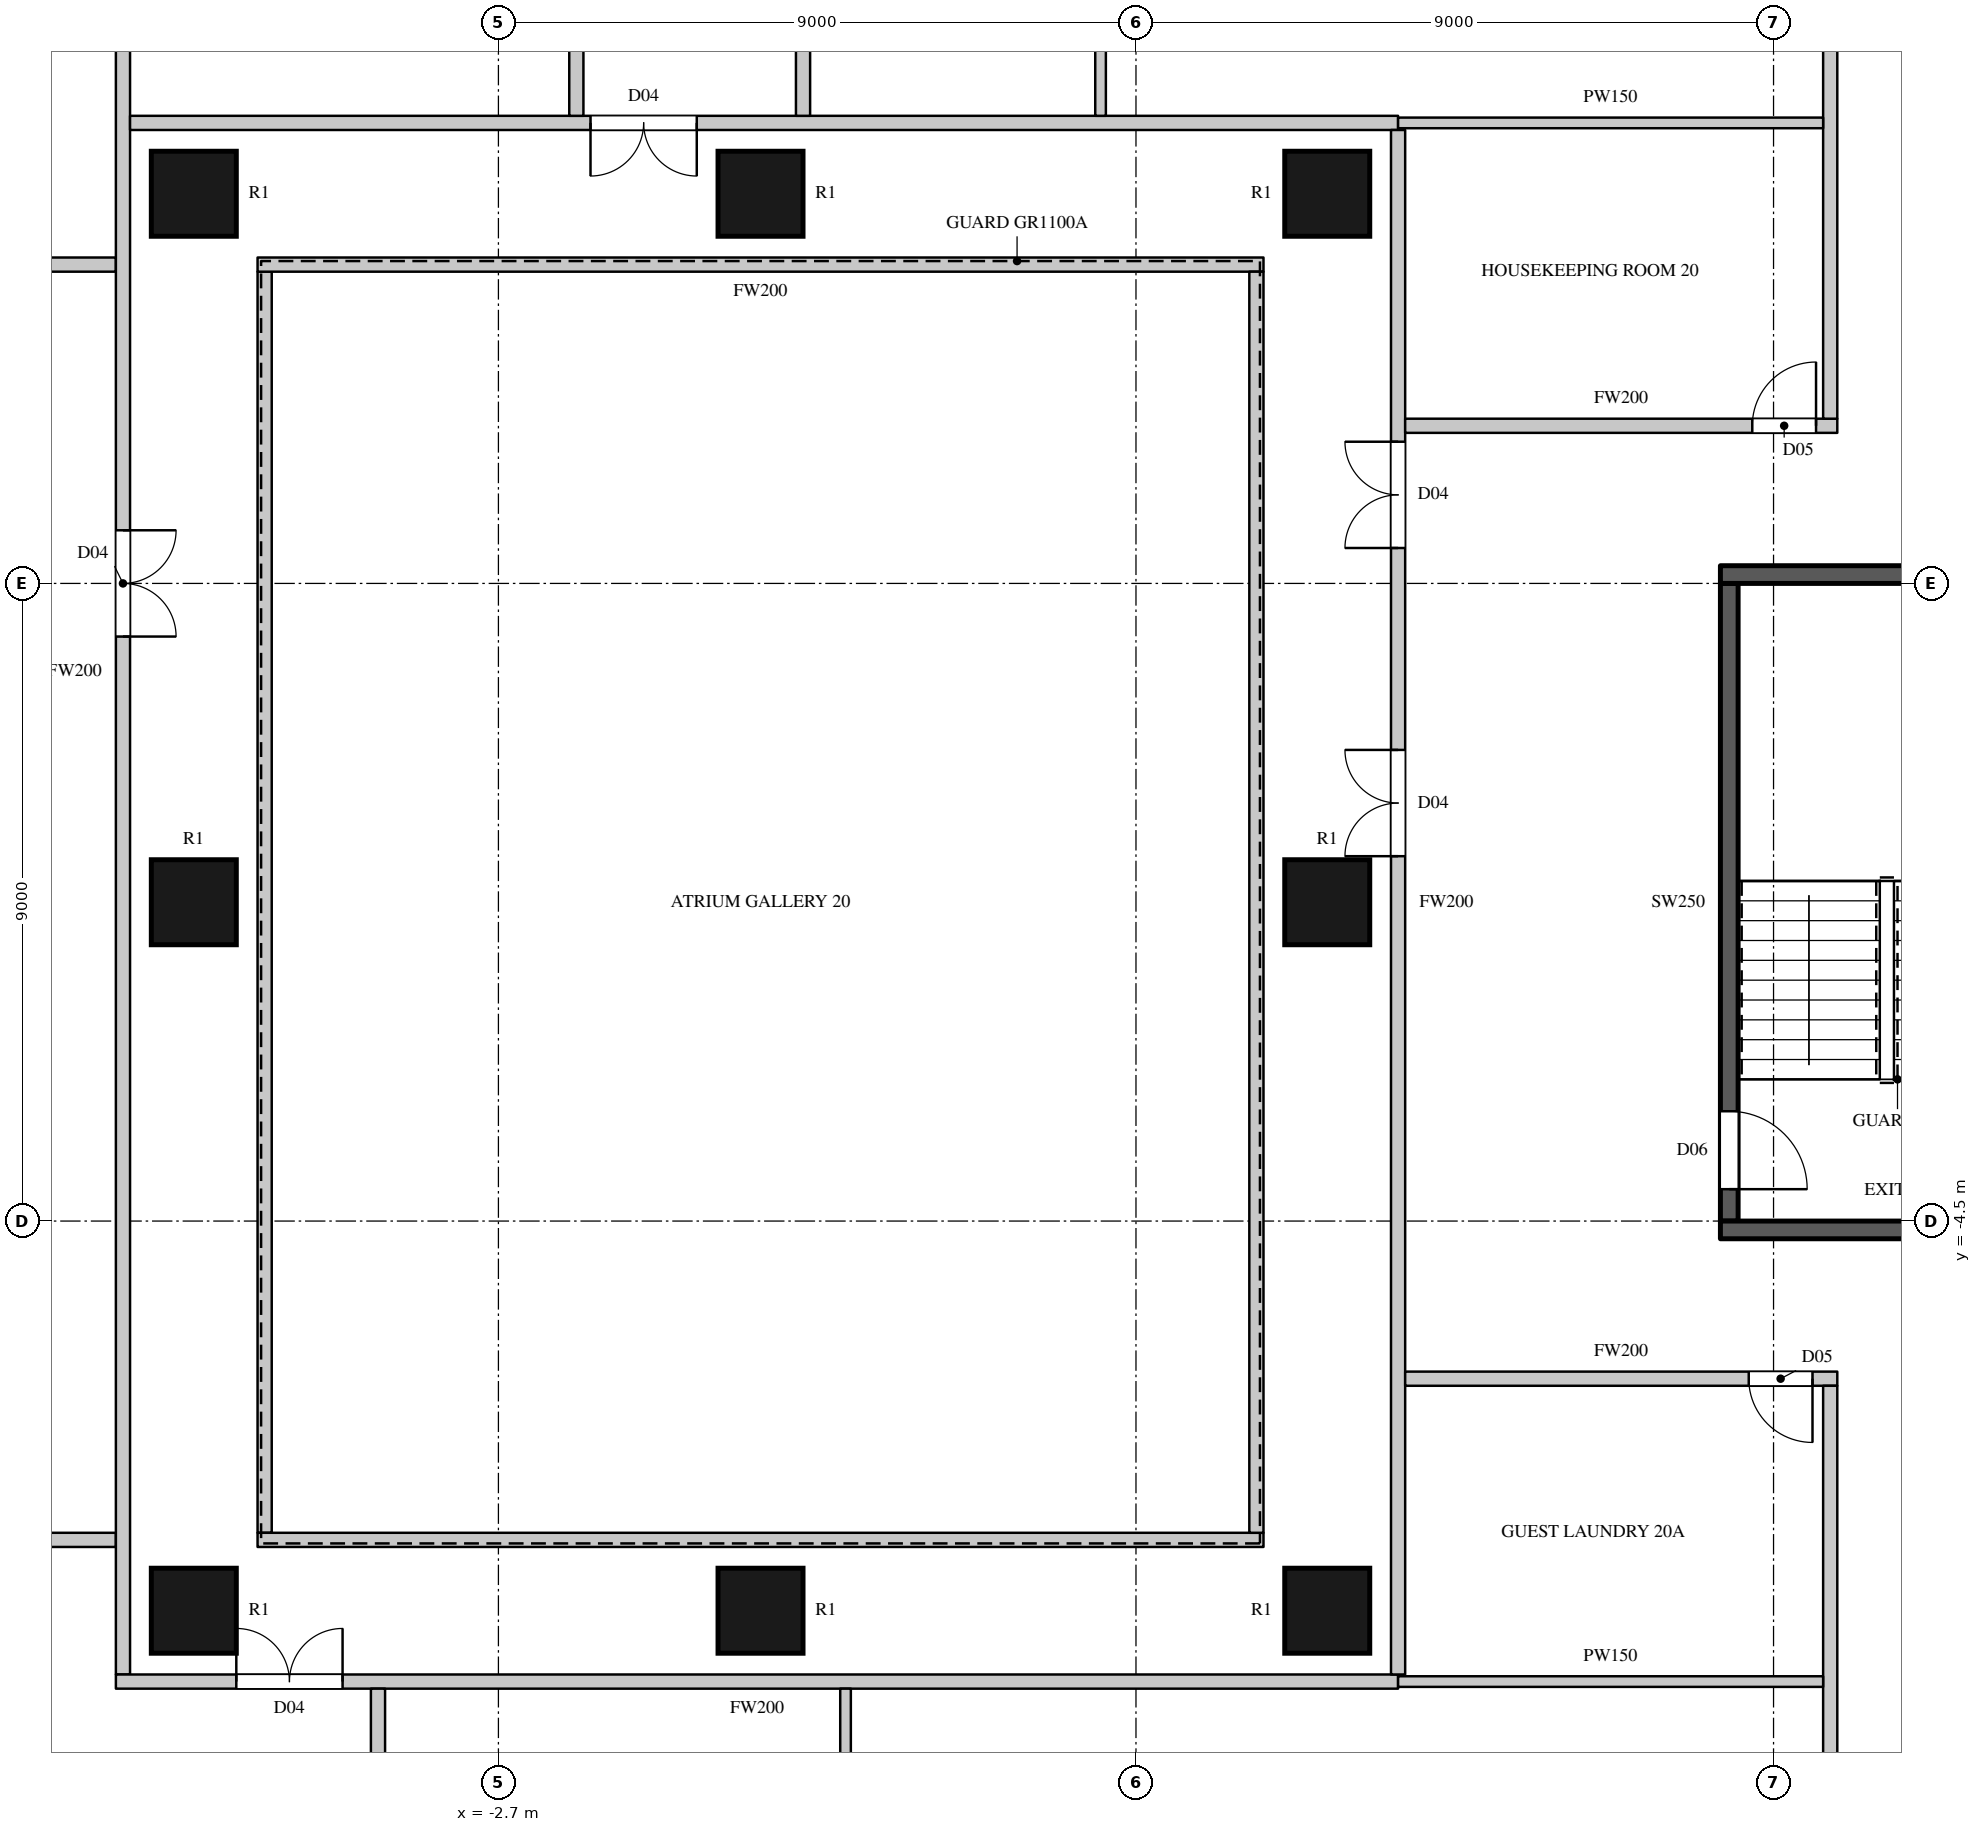
"""IFC4 building model, lengths in metres.
Left out: names, types, materials, properties, quantities, classifications, styles, units other than length and angle.
Written with IfcOpenShell. Run it as: python <this file> out.ifc"""

import sys

from ifc_helpers import new_model, si_unit, direction, frame, frame_2d, origin, origin_2d, place, context, subcontext, project, spatial, rectangle, circle, extrude, element, fill, save


model = new_model("IFC4")
c1 = context("Model", 3, precision=1e-05, world=origin(), true_north=direction((0.0, 1.0)))
c2 = subcontext(c1, "Body", "Model", "MODEL_VIEW")
j1 = project(units=[si_unit("LENGTHUNIT", "METRE"), si_unit("PLANEANGLEUNIT", "RADIAN")], contexts=[c1])
p1 = place(None, origin())
s1 = spatial("IfcSite", under=j1, at=p1, CompositionType="ELEMENT")
p2 = place(p1, origin())
s2 = spatial("IfcBuilding", under=s1, at=p2, CompositionType="ELEMENT")
p3 = place(p2, frame((0.0, 0.0, 102.3)))
s3 = spatial("IfcBuildingStorey", under=s2, at=p3, CompositionType="ELEMENT", Elevation=102.3)
for number, where, z_axis, x_axis in (
    (1, (-7.0, -10.0, 0.0), (0.0, 0.0, 1.0), (1.0, 0.0, 0.0)),
    (2, (-7.0, 0.0, 0.0), (0.0, 0.0, 1.0), (1.0, 0.0, 0.0)),
    (3, (-7.0, 10.0, 0.0), (0.0, 0.0, 1.0), (1.0, 0.0, 0.0)),
    (4, (1.0, -10.0, 0.0), (0.0, 0.0, 1.0), (1.0, 0.0, 0.0)),
    (5, (1.0, 10.0, 0.0), (0.0, 0.0, 1.0), (1.0, 0.0, 0.0)),
    (6, (9.0, -10.0, 0.0), (0.0, 0.0, 1.0), (1.0, 0.0, 0.0)),
    (7, (9.0, 0.0, 0.0), (0.0, 0.0, 1.0), (1.0, 0.0, 0.0)),
    (8, (9.0, 10.0, 0.0), (0.0, 0.0, 1.0), (1.0, 0.0, 0.0)),
):
    element("IfcColumn", number, at=place(p3, frame(where, z_axis=z_axis, x_axis=x_axis)), inside=s3, PredefinedType="COLUMN", context=c2, shape_type="SweptSolid", body=[
        extrude(circle(Radius=0.6, at=origin_2d()), origin(), (0.0, 0.0, 1.0), 3.6),
    ])
p4 = place(p3, frame((-13.97, -9.0, 0.0), z_axis=(0.0, 0.0, 1.0), x_axis=(1.0, 0.0, 0.0)))
e9 = element("IfcWall", 9, at=p4, inside=s3, PredefinedType="PARTITIONING", context=c2, shape_type="SweptSolid", body=[
    extrude(rectangle(XDim=5.87, YDim=0.2, at=frame_2d((2.935, 0.0))), origin(), (0.0, 0.0, 1.0), 3.3),
])
p5 = place(p4, frame((0.4, 0.0, 0.0)))
e10 = element("IfcOpeningElement", 10, at=p5, cuts=e9, PredefinedType="OPENING", context=c2, shape_type="SweptSolid", body=[
    extrude(rectangle(XDim=1.5, YDim=2.2, at=frame_2d((0.75, 1.1))), frame((0.0, 0.11, 0.0), z_axis=(0.0, -1.0, 0.0), x_axis=(1.0, 0.0, 0.0)), (0.0, 0.0, 1.0), 0.22),
])
p6 = place(p4, frame((2.05, 0.0, 0.0)))
e11 = element("IfcOpeningElement", 11, at=p6, cuts=e9, PredefinedType="OPENING", context=c2, shape_type="SweptSolid", body=[
    extrude(rectangle(XDim=1.5, YDim=2.2, at=frame_2d((0.75, 1.1))), frame((0.0, 0.11, 0.0), z_axis=(0.0, -1.0, 0.0), x_axis=(1.0, 0.0, 0.0)), (0.0, 0.0, 1.0), 0.22),
])
p7 = place(p3, frame((-13.97, 9.0, 0.0), z_axis=(0.0, 0.0, 1.0), x_axis=(1.0, 0.0, 0.0)))
e12 = element("IfcWall", 12, at=p7, inside=s3, PredefinedType="PARTITIONING", context=c2, shape_type="SweptSolid", body=[
    extrude(rectangle(XDim=5.87, YDim=0.2, at=frame_2d((2.935, 0.0))), origin(), (0.0, 0.0, 1.0), 3.3),
])
p8 = place(p3, frame((-8.0, -10.9, 0.0), z_axis=(0.0, 0.0, 1.0), x_axis=(0.0, 1.0, 0.0)))
e13 = element("IfcWall", 13, at=p8, inside=s3, PredefinedType="PARTITIONING", context=c2, shape_type="SweptSolid", body=[
    extrude(rectangle(XDim=28.3, YDim=0.2, at=frame_2d((14.15, 0.0))), origin(), (0.0, 0.0, 1.0), 3.3),
])
p9 = place(p8, frame((14.65, 0.0, 0.0)))
e14 = element("IfcOpeningElement", 14, at=p9, cuts=e13, PredefinedType="OPENING", context=c2, shape_type="SweptSolid", body=[
    extrude(rectangle(XDim=1.5, YDim=2.2, at=frame_2d((0.75, 1.1))), frame((0.0, 0.11, 0.0), z_axis=(0.0, -1.0, 0.0), x_axis=(1.0, 0.0, 0.0)), (0.0, 0.0, 1.0), 0.22),
])
p10 = place(p8, frame((26.55, 0.0, 0.0)))
e15 = element("IfcOpeningElement", 15, at=p10, cuts=e13, PredefinedType="OPENING", context=c2, shape_type="SweptSolid", body=[
    extrude(rectangle(XDim=1.6, YDim=2.4, at=frame_2d((0.8, 1.2))), frame((0.0, 0.11, 0.0), z_axis=(0.0, -1.0, 0.0), x_axis=(1.0, 0.0, 0.0)), (0.0, 0.0, 1.0), 0.22),
])
p11 = place(p3, frame((-8.1, -11.0, 0.0), z_axis=(0.0, 0.0, 1.0), x_axis=(1.0, 0.0, 0.0)))
e16 = element("IfcWall", 16, at=p11, inside=s3, PredefinedType="PARTITIONING", context=c2, shape_type="SweptSolid", body=[
    extrude(rectangle(XDim=18.1, YDim=0.2, at=frame_2d((9.05, 0.0))), origin(), (0.0, 0.0, 1.0), 3.3),
])
p12 = place(p11, frame((1.7, 0.0, 0.0)))
e17 = element("IfcOpeningElement", 17, at=p12, cuts=e16, PredefinedType="OPENING", context=c2, shape_type="SweptSolid", body=[
    extrude(rectangle(XDim=1.5, YDim=2.2, at=frame_2d((0.75, 1.1))), frame((0.0, 0.11, 0.0), z_axis=(0.0, -1.0, 0.0), x_axis=(1.0, 0.0, 0.0)), (0.0, 0.0, 1.0), 0.22),
])
p13 = place(p3, frame((-7.9, 11.0, 0.0), z_axis=(0.0, 0.0, 1.0), x_axis=(1.0, 0.0, 0.0)))
e18 = element("IfcWall", 18, at=p13, inside=s3, PredefinedType="PARTITIONING", context=c2, shape_type="SweptSolid", body=[
    extrude(rectangle(XDim=17.9, YDim=0.2, at=frame_2d((8.95, 0.0))), origin(), (0.0, 0.0, 1.0), 3.3),
])
p14 = place(p13, frame((6.5, 0.0, 0.0)))
e19 = element("IfcOpeningElement", 19, at=p14, cuts=e18, PredefinedType="OPENING", context=c2, shape_type="SweptSolid", body=[
    extrude(rectangle(XDim=1.5, YDim=2.2, at=frame_2d((0.75, 1.1))), frame((0.0, 0.11, 0.0), z_axis=(0.0, -1.0, 0.0), x_axis=(1.0, 0.0, 0.0)), (0.0, 0.0, 1.0), 0.22),
])
p15 = place(p3, frame((-6.0, -8.9, 0.0), z_axis=(0.0, 0.0, 1.0), x_axis=(0.0, 1.0, 0.0)))
e20 = element("IfcWall", 20, at=p15, inside=s3, PredefinedType="PARTITIONING", context=c2, shape_type="SweptSolid", body=[
    extrude(rectangle(XDim=17.8, YDim=0.2, at=frame_2d((8.9, 0.0))), origin(), (0.0, 0.0, 1.0), 3.3),
])
for number, where, z_axis, x_axis in (
    (21, (-6.1, -9.0, 0.0), (0.0, 0.0, 1.0), (1.0, 0.0, 0.0)),
    (22, (-6.1, 9.0, 0.0), (0.0, 0.0, 1.0), (1.0, 0.0, 0.0)),
):
    element("IfcWall", number, at=place(p3, frame(where, z_axis=z_axis, x_axis=x_axis)), inside=s3, PredefinedType="PARTITIONING", context=c2, shape_type="SweptSolid", body=[
        extrude(rectangle(XDim=14.2, YDim=0.2, at=frame_2d((7.1, 0.0))), origin(), (0.0, 0.0, 1.0), 3.3),
    ])
p16 = place(p3, frame((-4.4, -17.4, 0.0), z_axis=(0.0, 0.0, 1.0), x_axis=(0.0, 1.0, 0.0)))
e23 = element("IfcWall", 23, at=p16, inside=s3, PredefinedType="PARTITIONING", context=c2, shape_type="SweptSolid", body=[
    extrude(rectangle(XDim=6.3, YDim=0.2, at=frame_2d((3.15, 0.0))), origin(), (0.0, 0.0, 1.0), 3.3),
])
p17 = place(p16, frame((0.15, 0.0, 0.0)))
e24 = element("IfcOpeningElement", 24, at=p17, cuts=e23, PredefinedType="OPENING", context=c2, shape_type="SweptSolid", body=[
    extrude(rectangle(XDim=1.6, YDim=2.4, at=frame_2d((0.8, 1.2))), frame((0.0, 0.11, 0.0), z_axis=(0.0, -1.0, 0.0), x_axis=(1.0, 0.0, 0.0)), (0.0, 0.0, 1.0), 0.22),
])
p18 = place(p3, frame((-1.6, 11.1, 0.0), z_axis=(0.0, 0.0, 1.0), x_axis=(0.0, 1.0, 0.0)))
e25 = element("IfcWall", 25, at=p18, inside=s3, PredefinedType="PARTITIONING", context=c2, shape_type="SweptSolid", body=[
    extrude(rectangle(XDim=6.3, YDim=0.2, at=frame_2d((3.15, 0.0))), origin(), (0.0, 0.0, 1.0), 3.3),
])
p19 = place(p3, frame((1.6, 11.1, 0.0), z_axis=(0.0, 0.0, 1.0), x_axis=(0.0, 1.0, 0.0)))
e26 = element("IfcWall", 26, at=p19, inside=s3, PredefinedType="PARTITIONING", context=c2, shape_type="SweptSolid", body=[
    extrude(rectangle(XDim=6.3, YDim=0.2, at=frame_2d((3.15, 0.0))), origin(), (0.0, 0.0, 1.0), 3.3),
])
p20 = place(p19, frame((5.25, 0.0, 0.0)))
e27 = element("IfcOpeningElement", 27, at=p20, cuts=e26, PredefinedType="OPENING", context=c2, shape_type="SweptSolid", body=[
    extrude(rectangle(XDim=0.9, YDim=2.2, at=frame_2d((0.45, 1.1))), frame((0.0, 0.11, 0.0), z_axis=(0.0, -1.0, 0.0), x_axis=(1.0, 0.0, 0.0)), (0.0, 0.0, 1.0), 0.22),
])
p21 = place(p3, frame((8.0, -8.9, 0.0), z_axis=(0.0, 0.0, 1.0), x_axis=(0.0, 1.0, 0.0)))
e28 = element("IfcWall", 28, at=p21, inside=s3, PredefinedType="PARTITIONING", context=c2, shape_type="SweptSolid", body=[
    extrude(rectangle(XDim=17.8, YDim=0.2, at=frame_2d((8.9, 0.0))), origin(), (0.0, 0.0, 1.0), 3.3),
])
p22 = place(p3, frame((10.0, -10.9, 0.0), z_axis=(0.0, 0.0, 1.0), x_axis=(0.0, 1.0, 0.0)))
e29 = element("IfcWall", 29, at=p22, inside=s3, PredefinedType="PARTITIONING", context=c2, shape_type="SweptSolid", body=[
    extrude(rectangle(XDim=21.8, YDim=0.2, at=frame_2d((10.9, 0.0))), origin(), (0.0, 0.0, 1.0), 3.3),
])
p23 = place(p22, frame((15.9, 0.0, 0.0)))
e30 = element("IfcOpeningElement", 30, at=p23, cuts=e29, PredefinedType="OPENING", context=c2, shape_type="SweptSolid", body=[
    extrude(rectangle(XDim=1.5, YDim=2.2, at=frame_2d((0.75, 1.1))), frame((0.0, 0.11, 0.0), z_axis=(0.0, -1.0, 0.0), x_axis=(1.0, 0.0, 0.0)), (0.0, 0.0, 1.0), 0.22),
])
p24 = place(p22, frame((11.55, 0.0, 0.0)))
e31 = element("IfcOpeningElement", 31, at=p24, cuts=e29, PredefinedType="OPENING", context=c2, shape_type="SweptSolid", body=[
    extrude(rectangle(XDim=1.5, YDim=2.2, at=frame_2d((0.75, 1.1))), frame((0.0, 0.11, 0.0), z_axis=(0.0, -1.0, 0.0), x_axis=(1.0, 0.0, 0.0)), (0.0, 0.0, 1.0), 0.22),
])
p25 = place(p3, frame((10.1, -6.725, 0.0), z_axis=(0.0, 0.0, 1.0), x_axis=(1.0, 0.0, 0.0)))
e32 = element("IfcWall", 32, at=p25, inside=s3, PredefinedType="PARTITIONING", context=c2, shape_type="SweptSolid", body=[
    extrude(rectangle(XDim=6.1, YDim=0.2, at=frame_2d((3.05, 0.0))), origin(), (0.0, 0.0, 1.0), 3.3),
])
p26 = place(p25, frame((4.85, 0.0, 0.0)))
e33 = element("IfcOpeningElement", 33, at=p26, cuts=e32, PredefinedType="OPENING", context=c2, shape_type="SweptSolid", body=[
    extrude(rectangle(XDim=0.9, YDim=2.2, at=frame_2d((0.45, 1.1))), frame((0.0, 0.11, 0.0), z_axis=(0.0, -1.0, 0.0), x_axis=(1.0, 0.0, 0.0)), (0.0, 0.0, 1.0), 0.22),
])
p27 = place(p3, frame((10.1, 6.725, 0.0), z_axis=(0.0, 0.0, 1.0), x_axis=(1.0, 0.0, 0.0)))
e34 = element("IfcWall", 34, at=p27, inside=s3, PredefinedType="PARTITIONING", context=c2, shape_type="SweptSolid", body=[
    extrude(rectangle(XDim=6.1, YDim=0.2, at=frame_2d((3.05, 0.0))), origin(), (0.0, 0.0, 1.0), 3.3),
])
p28 = place(p27, frame((4.9, 0.0, 0.0)))
e35 = element("IfcOpeningElement", 35, at=p28, cuts=e34, PredefinedType="OPENING", context=c2, shape_type="SweptSolid", body=[
    extrude(rectangle(XDim=0.9, YDim=2.2, at=frame_2d((0.45, 1.1))), frame((0.0, 0.11, 0.0), z_axis=(0.0, -1.0, 0.0), x_axis=(1.0, 0.0, 0.0)), (0.0, 0.0, 1.0), 0.22),
])
for number, where, z_axis, x_axis in (
    (36, (16.1, -17.4, 0.0), (0.0, 0.0, 1.0), (0.0, 1.0, 0.0)),
    (37, (16.1, 6.825, 0.0), (0.0, 0.0, 1.0), (0.0, 1.0, 0.0)),
):
    element("IfcWall", number, at=place(p3, frame(where, z_axis=z_axis, x_axis=x_axis)), inside=s3, PredefinedType="PARTITIONING", context=c2, shape_type="SweptSolid", body=[
        extrude(rectangle(XDim=10.575, YDim=0.2, at=frame_2d((5.288, 0.0))), origin(), (0.0, 0.0, 1.0), 3.3),
    ])
p29 = place(p3, frame((2.2, -17.4, 0.0), z_axis=(0.0, 0.0, 1.0), x_axis=(0.0, 1.0, 0.0)))
e38 = element("IfcWall", 38, at=p29, inside=s3, PredefinedType="PARTITIONING", context=c2, shape_type="SweptSolid", body=[
    extrude(rectangle(XDim=6.3, YDim=0.15, at=frame_2d((3.15, 0.0))), origin(), (0.0, 0.0, 1.0), 3.3),
])
p30 = place(p3, frame((5.8, 11.1, 0.0), z_axis=(0.0, 0.0, 1.0), x_axis=(0.0, 1.0, 0.0)))
e39 = element("IfcWall", 39, at=p30, inside=s3, PredefinedType="PARTITIONING", context=c2, shape_type="SweptSolid", body=[
    extrude(rectangle(XDim=5.989, YDim=0.15, at=frame_2d((2.994, 0.0))), origin(), (0.0, 0.0, 1.0), 3.3),
])
for number, where, z_axis, x_axis in (
    (40, (10.0, -11.0, 0.0), (0.0, 0.0, 1.0), (1.0, 0.0, 0.0)),
    (41, (10.0, 11.0, 0.0), (0.0, 0.0, 1.0), (1.0, 0.0, 0.0)),
):
    element("IfcWall", number, at=place(p3, frame(where, z_axis=z_axis, x_axis=x_axis)), inside=s3, PredefinedType="PARTITIONING", context=c2, shape_type="SweptSolid", body=[
        extrude(rectangle(XDim=6.0, YDim=0.15, at=frame_2d((3.0, 0.0))), origin(), (0.0, 0.0, 1.0), 3.3),
    ])
p31 = place(p3, frame((14.675, -4.5, 0.0), z_axis=(0.0, 0.0, 1.0), x_axis=(0.0, 1.0, 0.0)))
e42 = element("IfcWall", 42, at=p31, inside=s3, PredefinedType="SHEAR", context=c2, shape_type="SweptSolid", body=[
    extrude(rectangle(XDim=9.0, YDim=0.25, at=frame_2d((4.5, 0.0))), origin(), (0.0, 0.0, 1.0), 3.3),
])
p32 = place(p31, frame((0.45, 0.0, 0.0)))
e43 = element("IfcOpeningElement", 43, at=p32, cuts=e42, PredefinedType="OPENING", context=c2, shape_type="SweptSolid", body=[
    extrude(rectangle(XDim=1.1, YDim=2.2, at=frame_2d((0.55, 1.1))), frame((0.0, 0.135, 0.0), z_axis=(0.0, -1.0, 0.0), x_axis=(1.0, 0.0, 0.0)), (0.0, 0.0, 1.0), 0.27),
])
for number, where, z_axis, x_axis in (
    (44, (14.55, -4.625, 0.0), (0.0, 0.0, 1.0), (1.0, 0.0, 0.0)),
    (45, (14.55, 4.625, 0.0), (0.0, 0.0, 1.0), (1.0, 0.0, 0.0)),
):
    element("IfcWall", number, at=place(p3, frame(where, z_axis=z_axis, x_axis=x_axis)), inside=s3, PredefinedType="SHEAR", context=c2, shape_type="SweptSolid", body=[
        extrude(rectangle(XDim=4.7, YDim=0.25, at=frame_2d((2.35, 0.0))), origin(), (0.0, 0.0, 1.0), 3.3),
    ])
p33 = place(p9, origin())
e46 = element("IfcDoor", 46, at=p33, inside=s3, OperationType="DOUBLE_DOOR_SINGLE_SWING", PredefinedType="DOOR", context=c2, shape_type="SweptSolid", body=[
    extrude(rectangle(XDim=1.5, YDim=2.2, at=frame_2d((0.75, 1.1))), frame((0.0, 0.025, 0.0), z_axis=(0.0, -1.0, 0.0), x_axis=(1.0, 0.0, 0.0)), (0.0, 0.0, 1.0), 0.05),
])
fill(e14, e46)
p34 = place(p12, origin())
e47 = element("IfcDoor", 47, at=p34, inside=s3, OperationType="DOUBLE_DOOR_SINGLE_SWING", PredefinedType="DOOR", context=c2, shape_type="SweptSolid", body=[
    extrude(rectangle(XDim=1.5, YDim=2.2, at=frame_2d((0.75, 1.1))), frame((0.0, 0.025, 0.0), z_axis=(0.0, -1.0, 0.0), x_axis=(1.0, 0.0, 0.0)), (0.0, 0.0, 1.0), 0.05),
])
fill(e17, e47)
p35 = place(p14, origin())
e48 = element("IfcDoor", 48, at=p35, inside=s3, OperationType="DOUBLE_DOOR_SINGLE_SWING", PredefinedType="DOOR", context=c2, shape_type="SweptSolid", body=[
    extrude(rectangle(XDim=1.5, YDim=2.2, at=frame_2d((0.75, 1.1))), frame((0.0, 0.025, 0.0), z_axis=(0.0, -1.0, 0.0), x_axis=(1.0, 0.0, 0.0)), (0.0, 0.0, 1.0), 0.05),
])
fill(e19, e48)
p36 = place(p23, origin())
e49 = element("IfcDoor", 49, at=p36, inside=s3, OperationType="DOUBLE_DOOR_SINGLE_SWING", PredefinedType="DOOR", context=c2, shape_type="SweptSolid", body=[
    extrude(rectangle(XDim=1.5, YDim=2.2, at=frame_2d((0.75, 1.1))), frame((0.0, 0.025, 0.0), z_axis=(0.0, -1.0, 0.0), x_axis=(1.0, 0.0, 0.0)), (0.0, 0.0, 1.0), 0.05),
])
fill(e30, e49)
p37 = place(p24, origin())
e50 = element("IfcDoor", 50, at=p37, inside=s3, OperationType="DOUBLE_DOOR_SINGLE_SWING", PredefinedType="DOOR", context=c2, shape_type="SweptSolid", body=[
    extrude(rectangle(XDim=1.5, YDim=2.2, at=frame_2d((0.75, 1.1))), frame((0.0, 0.025, 0.0), z_axis=(0.0, -1.0, 0.0), x_axis=(1.0, 0.0, 0.0)), (0.0, 0.0, 1.0), 0.05),
])
fill(e31, e50)
p38 = place(p26, origin())
e51 = element("IfcDoor", 51, at=p38, inside=s3, OperationType="SINGLE_SWING_LEFT", PredefinedType="DOOR", context=c2, shape_type="SweptSolid", body=[
    extrude(rectangle(XDim=0.9, YDim=2.2, at=frame_2d((0.45, 1.1))), frame((0.0, 0.025, 0.0), z_axis=(0.0, -1.0, 0.0), x_axis=(1.0, 0.0, 0.0)), (0.0, 0.0, 1.0), 0.05),
])
fill(e33, e51)
p39 = place(p28, origin())
e52 = element("IfcDoor", 52, at=p39, inside=s3, OperationType="SINGLE_SWING_RIGHT", PredefinedType="DOOR", context=c2, shape_type="SweptSolid", body=[
    extrude(rectangle(XDim=0.9, YDim=2.2, at=frame_2d((0.45, 1.1))), frame((0.0, 0.025, 0.0), z_axis=(0.0, -1.0, 0.0), x_axis=(1.0, 0.0, 0.0)), (0.0, 0.0, 1.0), 0.05),
])
fill(e35, e52)
p40 = place(p32, origin())
e53 = element("IfcDoor", 53, at=p40, inside=s3, OperationType="SINGLE_SWING_RIGHT", PredefinedType="DOOR", context=c2, shape_type="SweptSolid", body=[
    extrude(rectangle(XDim=1.1, YDim=2.2, at=frame_2d((0.55, 1.1))), frame((0.0, 0.025, 0.0), z_axis=(0.0, -1.0, 0.0), x_axis=(1.0, 0.0, 0.0)), (0.0, 0.0, 1.0), 0.05),
])
fill(e43, e53)
save(model, sys.argv[1])
